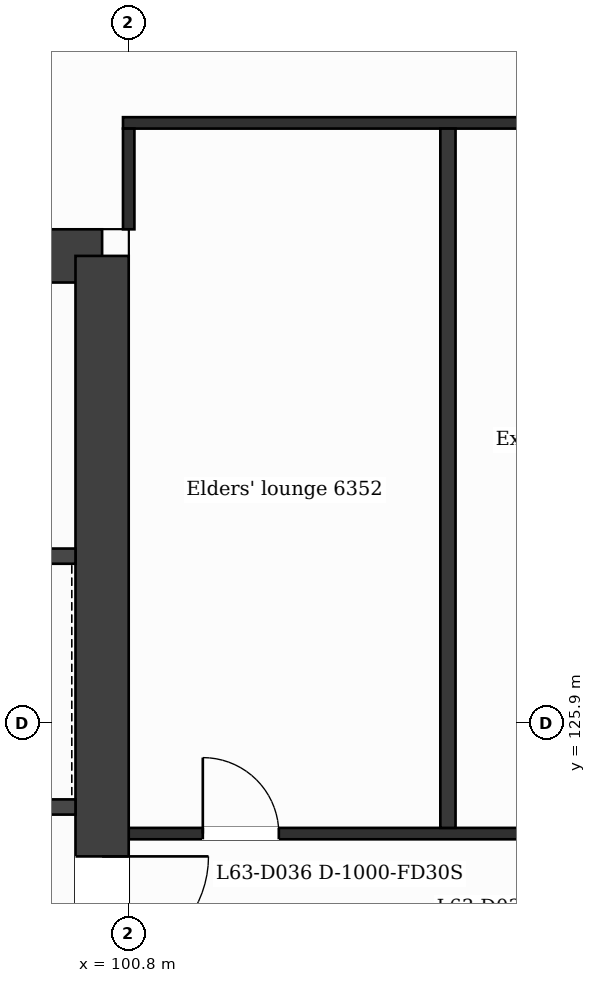
"""IFC4 building model, lengths in metres.
Left out: names, types, materials, properties, quantities, classifications, styles, units other than length and angle.
Written with IfcOpenShell. Run it as: python <this file> out.ifc"""

import sys

from ifc_helpers import new_model, si_unit, direction, frame, frame_2d, origin, place, context, subcontext, project, spatial, rectangle, extrude, element, fill, save


model = new_model("IFC4")
c1 = context("Model", 3, precision=1e-05, world=origin(), true_north=direction((0.0, 1.0)))
c2 = subcontext(c1, "Body", "Model", "MODEL_VIEW")
j1 = project(units=[si_unit("LENGTHUNIT", "METRE"), si_unit("PLANEANGLEUNIT", "RADIAN")], contexts=[c1])
p1 = place(None, origin())
s1 = spatial("IfcSite", under=j1, at=p1, CompositionType="ELEMENT")
p2 = place(p1, origin())
s2 = spatial("IfcBuilding", under=s1, at=p2, CompositionType="ELEMENT")
p3 = place(p2, frame((0.0, 0.0, 262.7)))
s3 = spatial("IfcBuildingStorey", under=s2, at=p3, CompositionType="ELEMENT", Elevation=262.7)
p4 = place(p3, frame((88.937, 132.05, 0.0), z_axis=(0.0, 0.0, 1.0), x_axis=(1.0, 0.0, 0.0)))
e1 = element("IfcWall", 1, at=p4, inside=s3, PredefinedType="SHEAR", context=c2, shape_type="SweptSolid", body=[
    extrude(rectangle(XDim=11.513, YDim=0.7, at=frame_2d((5.757, 0.0))), origin(), (0.0, 0.0, 1.0), 3.7),
])
p5 = place(p4, frame((6.927, 0.0, 0.0)))
e2 = element("IfcOpeningElement", 2, at=p5, cuts=e1, PredefinedType="OPENING", context=c2, shape_type="SweptSolid", body=[
    extrude(rectangle(XDim=1.2, YDim=2.1, at=frame_2d((0.6, 1.05))), frame((0.0, 0.36, 0.0), z_axis=(0.0, -1.0, 0.0), x_axis=(1.0, 0.0, 0.0)), (0.0, 0.0, 1.0), 0.72),
])
p6 = place(p3, frame((100.45, 132.05, 0.0), z_axis=(0.0, 0.0, 1.0), x_axis=(0.0, -1.0, 0.0)))
e3 = element("IfcWall", 3, at=p6, inside=s3, PredefinedType="SHEAR", context=c2, shape_type="SweptSolid", body=[
    extrude(rectangle(XDim=21.3, YDim=0.7, at=frame_2d((10.65, 0.0))), origin(), (0.0, 0.0, 1.0), 3.7),
])
p7 = place(p6, frame((7.9, 0.0, 0.0)))
e4 = element("IfcOpeningElement", 4, at=p7, cuts=e3, PredefinedType="OPENING", context=c2, shape_type="SweptSolid", body=[
    extrude(rectangle(XDim=1.4, YDim=2.1, at=frame_2d((0.7, 1.05))), frame((0.0, 0.36, 0.0), z_axis=(0.0, -1.0, 0.0), x_axis=(1.0, 0.0, 0.0)), (0.0, 0.0, 1.0), 0.72),
])
p8 = place(p3, frame((100.8, 124.45, 0.0), z_axis=(0.0, 0.0, 1.0), x_axis=(1.0, 0.0, 0.0)))
e5 = element("IfcWall", 5, at=p8, inside=s3, PredefinedType="PARTITIONING", context=c2, shape_type="SweptSolid", body=[
    extrude(rectangle(XDim=25.2, YDim=0.15, at=frame_2d((12.6, 0.0))), origin(), (0.0, 0.0, 1.0), 3.38),
])
p9 = place(p8, frame((0.975, 0.0, 0.0)))
e6 = element("IfcOpeningElement", 6, at=p9, cuts=e5, PredefinedType="OPENING", context=c2, shape_type="SweptSolid", body=[
    extrude(rectangle(XDim=1.0, YDim=2.1, at=frame_2d((0.5, 1.05))), frame((0.0, 0.085, 0.0), z_axis=(0.0, -1.0, 0.0), x_axis=(1.0, 0.0, 0.0)), (0.0, 0.0, 1.0), 0.17),
])
p10 = place(p8, frame((5.175, 0.0, 0.0)))
e7 = element("IfcOpeningElement", 7, at=p10, cuts=e5, PredefinedType="OPENING", context=c2, shape_type="SweptSolid", body=[
    extrude(rectangle(XDim=1.0, YDim=2.1, at=frame_2d((0.5, 1.05))), frame((0.0, 0.085, 0.0), z_axis=(0.0, -1.0, 0.0), x_axis=(1.0, 0.0, 0.0)), (0.0, 0.0, 1.0), 0.17),
])
p11 = place(p8, frame((13.775, 0.0, 0.0)))
e8 = element("IfcOpeningElement", 8, at=p11, cuts=e5, PredefinedType="OPENING", context=c2, shape_type="SweptSolid", body=[
    extrude(rectangle(XDim=1.0, YDim=2.1, at=frame_2d((0.5, 1.05))), frame((0.0, 0.085, 0.0), z_axis=(0.0, -1.0, 0.0), x_axis=(1.0, 0.0, 0.0)), (0.0, 0.0, 1.0), 0.17),
])
p12 = place(p8, frame((17.67, 0.0, 0.0)))
e9 = element("IfcOpeningElement", 9, at=p12, cuts=e5, PredefinedType="OPENING", context=c2, shape_type="SweptSolid", body=[
    extrude(rectangle(XDim=1.0, YDim=2.1, at=frame_2d((0.5, 1.05))), frame((0.0, 0.085, 0.0), z_axis=(0.0, -1.0, 0.0), x_axis=(1.0, 0.0, 0.0)), (0.0, 0.0, 1.0), 0.17),
])
p13 = place(p8, frame((23.225, 0.0, 0.0)))
e10 = element("IfcOpeningElement", 10, at=p13, cuts=e5, PredefinedType="OPENING", context=c2, shape_type="SweptSolid", body=[
    extrude(rectangle(XDim=1.0, YDim=2.1, at=frame_2d((0.5, 1.05))), frame((0.0, 0.085, 0.0), z_axis=(0.0, -1.0, 0.0), x_axis=(1.0, 0.0, 0.0)), (0.0, 0.0, 1.0), 0.17),
])
p14 = place(p3, frame((92.702, 124.8, 0.0), z_axis=(0.0, 0.0, 1.0), x_axis=(1.0, 0.0, 0.0)))
e11 = element("IfcWall", 11, at=p14, inside=s3, PredefinedType="PARTITIONING", context=c2, shape_type="SweptSolid", body=[
    extrude(rectangle(XDim=7.398, YDim=0.2, at=frame_2d((3.699, 0.0))), origin(), (0.0, 0.0, 1.0), 3.38),
])
p15 = place(p14, frame((5.636, 0.0, 0.0)))
e12 = element("IfcOpeningElement", 12, at=p15, cuts=e11, PredefinedType="OPENING", context=c2, shape_type="SweptSolid", body=[
    extrude(rectangle(XDim=1.1, YDim=2.1, at=frame_2d((0.55, 1.05))), frame((0.0, 0.11, 0.0), z_axis=(0.0, -1.0, 0.0), x_axis=(1.0, 0.0, 0.0)), (0.0, 0.0, 1.0), 0.22),
])
p16 = place(p3, frame((92.827, 128.1, 0.0), z_axis=(0.0, 0.0, 1.0), x_axis=(1.0, 0.0, 0.0)))
e13 = element("IfcWall", 13, at=p16, inside=s3, PredefinedType="PARTITIONING", context=c2, shape_type="SweptSolid", body=[
    extrude(rectangle(XDim=7.273, YDim=0.2, at=frame_2d((3.637, 0.0))), origin(), (0.0, 0.0, 1.0), 3.38),
])
p17 = place(p16, frame((3.086, 0.0, 0.0)))
e14 = element("IfcOpeningElement", 14, at=p17, cuts=e13, PredefinedType="OPENING", context=c2, shape_type="SweptSolid", body=[
    extrude(rectangle(XDim=1.1, YDim=2.1, at=frame_2d((0.55, 1.05))), frame((0.0, 0.11, 0.0), z_axis=(0.0, -1.0, 0.0), x_axis=(1.0, 0.0, 0.0)), (0.0, 0.0, 1.0), 0.22),
])
p18 = place(p3, frame((100.725, 133.8, 0.0), z_axis=(0.0, 0.0, 1.0), x_axis=(1.0, 0.0, 0.0)))
e15 = element("IfcWall", 15, at=p18, inside=s3, PredefinedType="PARTITIONING", context=c2, shape_type="SweptSolid", body=[
    extrude(rectangle(XDim=25.35, YDim=0.15, at=frame_2d((12.675, 0.0))), origin(), (0.0, 0.0, 1.0), 3.38),
])
p19 = place(p18, frame((19.1, 0.0, 0.0)))
e16 = element("IfcOpeningElement", 16, at=p19, cuts=e15, PredefinedType="OPENING", context=c2, shape_type="SweptSolid", body=[
    extrude(rectangle(XDim=1.0, YDim=2.1, at=frame_2d((0.5, 1.05))), frame((0.0, 0.085, 0.0), z_axis=(0.0, -1.0, 0.0), x_axis=(1.0, 0.0, 0.0)), (0.0, 0.0, 1.0), 0.17),
])
p20 = place(p3, frame((100.8, 132.4, 0.0), z_axis=(0.0, 0.0, 1.0), x_axis=(0.0, 1.0, 0.0)))
e17 = element("IfcWall", 17, at=p20, inside=s3, PredefinedType="PARTITIONING", context=c2, shape_type="SweptSolid", body=[
    extrude(rectangle(XDim=1.325, YDim=0.15, at=frame_2d((0.663, 0.0))), origin(), (0.0, 0.0, 1.0), 3.38),
])
p21 = place(p3, frame((105.0, 124.525, 0.0), z_axis=(0.0, 0.0, 1.0), x_axis=(0.0, 1.0, 0.0)))
e18 = element("IfcWall", 18, at=p21, inside=s3, PredefinedType="PARTITIONING", context=c2, shape_type="SweptSolid", body=[
    extrude(rectangle(XDim=9.2, YDim=0.2, at=frame_2d((4.6, 0.0))), origin(), (0.0, 0.0, 1.0), 3.38),
])
p22 = place(p9, origin())
e19 = element("IfcDoor", 19, at=p22, inside=s3, OperationType="SINGLE_SWING_LEFT", PredefinedType="DOOR", context=c2, shape_type="SweptSolid", body=[
    extrude(rectangle(XDim=1.0, YDim=2.1, at=frame_2d((0.5, 1.05))), frame((0.0, 0.025, 0.0), z_axis=(0.0, -1.0, 0.0), x_axis=(1.0, 0.0, 0.0)), (0.0, 0.0, 1.0), 0.05),
])
fill(e6, e19)
p23 = place(p7, origin())
e20 = element("IfcDoor", 20, at=p23, inside=s3, OperationType="SINGLE_SWING_LEFT", PredefinedType="DOOR", context=c2, shape_type="SweptSolid", body=[
    extrude(rectangle(XDim=1.4, YDim=2.1, at=frame_2d((0.7, 1.05))), frame((0.0, 0.025, 0.0), z_axis=(0.0, -1.0, 0.0), x_axis=(1.0, 0.0, 0.0)), (0.0, 0.0, 1.0), 0.05),
])
fill(e4, e20)
save(model, sys.argv[1])
